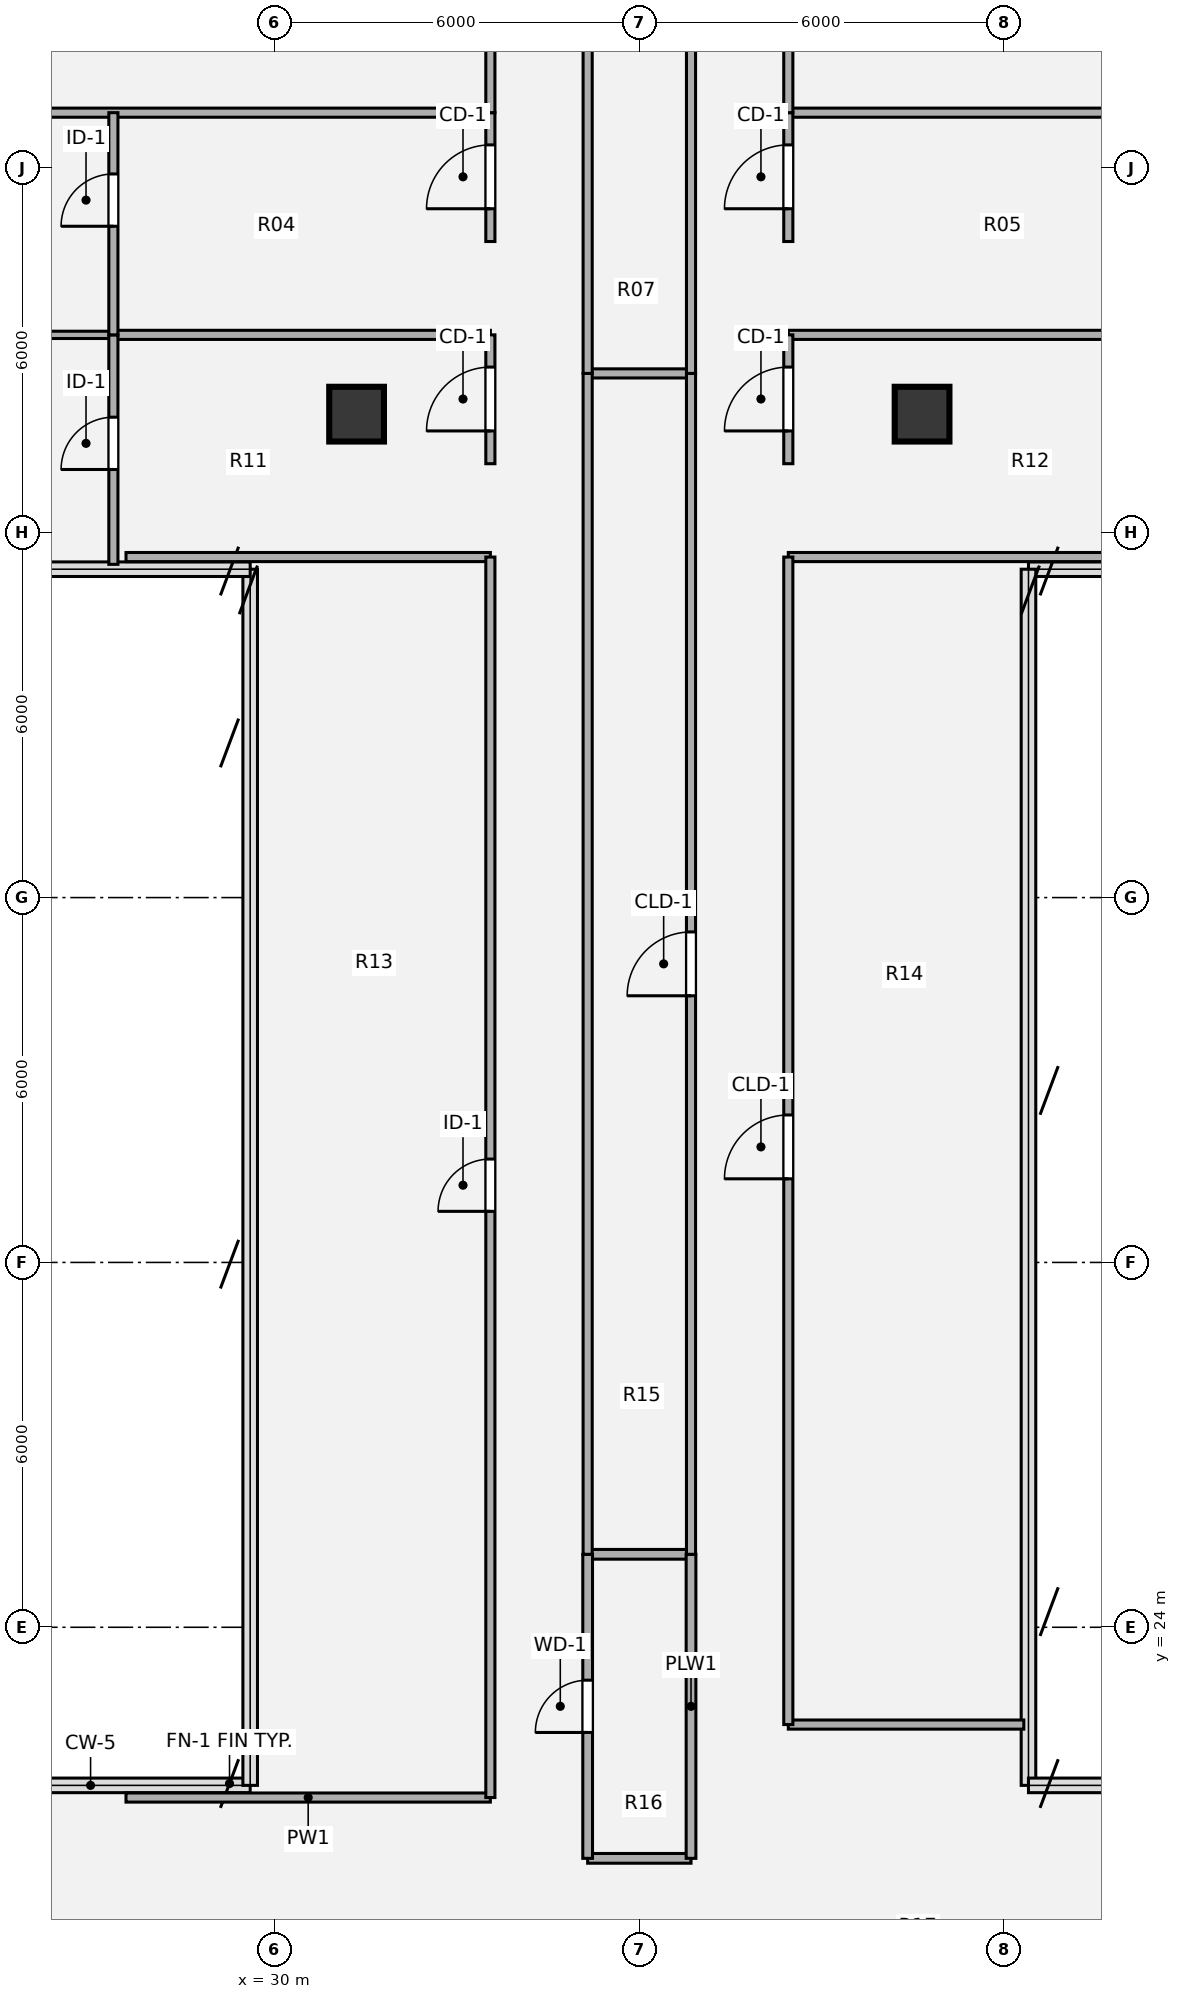
"""IFC4 building model, lengths in metres.
Left out: names, types, materials, properties, quantities, classifications, styles, units other than length and angle.
Written with IfcOpenShell. Run it as: python <this file> out.ifc"""

import sys

from ifc_helpers import new_model, si_unit, direction, frame, frame_2d, origin, origin_2d, place, context, subcontext, project, spatial, rectangle, hollow_circle, extrude, source, transform, mapped, element, fill, save


model = new_model("IFC4")
c1 = context("Model", 3, precision=1e-05, world=origin(), true_north=direction((0.0, 1.0)))
c2 = subcontext(c1, "Body", "Model", "MODEL_VIEW")
j1 = project(units=[si_unit("LENGTHUNIT", "METRE"), si_unit("PLANEANGLEUNIT", "RADIAN")], contexts=[c1])
p1 = place(None, origin())
s1 = spatial("IfcSite", under=j1, at=p1, CompositionType="ELEMENT")
p2 = place(p1, origin())
s2 = spatial("IfcBuilding", under=s1, at=p2, CompositionType="ELEMENT")
p3 = place(p2, frame((0.0, 0.0, 249.48)))
s3 = spatial("IfcBuildingStorey", under=s2, at=p3, CompositionType="ELEMENT", Elevation=249.48)
m1 = source(origin(), c2, "Body", "SweptSolid", [
    extrude(hollow_circle(Radius=0.45, WallThickness=0.032, at=origin_2d()), origin(), (0.0, 0.0, 1.0), 3.78),
])
for number, where, z_axis, x_axis in (
    (1, (31.35, 43.95, 0.0), (0.0, 0.0, 1.0), (1.0, 0.0, 0.0)),
    (2, (40.65, 43.95, 0.0), (0.0, 0.0, 1.0), (1.0, 0.0, 0.0)),
):
    element("IfcColumn", number, at=place(p3, frame(where, z_axis=z_axis, x_axis=x_axis)), inside=s3, PredefinedType="COLUMN", context=c2, shape_type="MappedRepresentation", body=[
        mapped(m1, transform((0.0, 0.0, 0.0), x_axis=(1.0, 0.0, 0.0), y_axis=(0.0, 1.0, 0.0), z_axis=(0.0, 0.0, 1.0), scale=1.0)),
    ])
p4 = place(p3, frame((35.15, 20.2, 0.0), z_axis=(0.0, 0.0, 1.0), x_axis=(1.0, 0.0, 0.0)))
e3 = element("IfcWall", 3, at=p4, inside=s3, PredefinedType="PLUMBINGWALL", context=c2, shape_type="SweptSolid", body=[
    extrude(rectangle(XDim=1.7, YDim=0.16, at=frame_2d((0.85, 0.0))), origin(), (0.0, 0.0, 1.0), 3.5),
])
p5 = place(p3, frame((27.558, 21.2, 0.0), z_axis=(0.0, 0.0, 1.0), x_axis=(1.0, 0.0, 0.0)))
e4 = element("IfcWall", 4, at=p5, inside=s3, PredefinedType="PARTITIONING", context=c2, shape_type="SweptSolid", body=[
    extrude(rectangle(XDim=5.992, YDim=0.15, at=frame_2d((2.996, 0.0))), origin(), (0.0, 0.0, 1.0), 3.5),
])
p6 = place(p3, frame((38.45, 22.4, 0.0), z_axis=(0.0, 0.0, 1.0), x_axis=(1.0, 0.0, 0.0)))
e5 = element("IfcWall", 5, at=p6, inside=s3, PredefinedType="PARTITIONING", context=c2, shape_type="SweptSolid", body=[
    extrude(rectangle(XDim=3.873, YDim=0.15, at=frame_2d((1.937, 0.0))), origin(), (0.0, 0.0, 1.0), 3.5),
])
p7 = place(p3, frame((35.15, 25.2, 0.0), z_axis=(0.0, 0.0, 1.0), x_axis=(1.0, 0.0, 0.0)))
e6 = element("IfcWall", 6, at=p7, inside=s3, PredefinedType="PLUMBINGWALL", context=c2, shape_type="SweptSolid", body=[
    extrude(rectangle(XDim=1.7, YDim=0.16, at=frame_2d((0.85, 0.0))), origin(), (0.0, 0.0, 1.0), 3.5),
])
p8 = place(p3, frame((27.558, 41.6, 0.0), z_axis=(0.0, 0.0, 1.0), x_axis=(1.0, 0.0, 0.0)))
e7 = element("IfcWall", 7, at=p8, inside=s3, PredefinedType="PARTITIONING", context=c2, shape_type="SweptSolid", body=[
    extrude(rectangle(XDim=5.992, YDim=0.15, at=frame_2d((2.996, 0.0))), origin(), (0.0, 0.0, 1.0), 3.5),
])
p9 = place(p3, frame((38.45, 41.6, 0.0), z_axis=(0.0, 0.0, 1.0), x_axis=(1.0, 0.0, 0.0)))
e8 = element("IfcWall", 8, at=p9, inside=s3, PredefinedType="PARTITIONING", context=c2, shape_type="SweptSolid", body=[
    extrude(rectangle(XDim=5.993, YDim=0.15, at=frame_2d((2.997, 0.0))), origin(), (0.0, 0.0, 1.0), 3.5),
])
p10 = place(p3, frame((35.15, 44.62, 0.0), z_axis=(0.0, 0.0, 1.0), x_axis=(1.0, 0.0, 0.0)))
e9 = element("IfcWall", 9, at=p10, inside=s3, PredefinedType="PARTITIONING", context=c2, shape_type="SweptSolid", body=[
    extrude(rectangle(XDim=1.7, YDim=0.15, at=frame_2d((0.85, 0.0))), origin(), (0.0, 0.0, 1.0), 3.259),
])
p11 = place(p3, frame((17.78, 45.254, 0.0), z_axis=(0.0, 0.0, 1.0), x_axis=(1.0, 0.0, 0.0)))
e10 = element("IfcWall", 10, at=p11, inside=s3, PredefinedType="PARTITIONING", context=c2, shape_type="SweptSolid", body=[
    extrude(rectangle(XDim=9.57, YDim=0.12, at=frame_2d((4.785, 0.0))), origin(), (0.0, 0.0, 1.0), 2.982),
])
for number, where, z_axis, x_axis in (
    (11, (27.35, 45.254, 0.0), (0.0, 0.0, 1.0), (1.0, 0.0, 0.0)),
    (12, (38.45, 45.254, 0.0), (0.0, 0.0, 1.0), (1.0, 0.0, 0.0)),
):
    element("IfcWall", number, at=place(p3, frame(where, z_axis=z_axis, x_axis=x_axis)), inside=s3, PredefinedType="PARTITIONING", context=c2, shape_type="SweptSolid", body=[
        extrude(rectangle(XDim=6.2, YDim=0.15, at=frame_2d((3.1, 0.0))), origin(), (0.0, 0.0, 1.0), 2.982),
    ])
for number, where, z_axis, x_axis in (
    (13, (17.78, 48.908, 0.0), (0.0, 0.0, 1.0), (1.0, 0.0, 0.0)),
    (14, (38.45, 48.908, 0.0), (0.0, 0.0, 1.0), (1.0, 0.0, 0.0)),
):
    element("IfcWall", number, at=place(p3, frame(where, z_axis=z_axis, x_axis=x_axis)), inside=s3, PredefinedType="PARTITIONING", context=c2, shape_type="SweptSolid", body=[
        extrude(rectangle(XDim=15.77, YDim=0.15, at=frame_2d((7.885, 0.0))), origin(), (0.0, 0.0, 1.0), 2.982),
    ])
p12 = place(p3, frame((27.35, 41.48, 0.0), z_axis=(0.0, 0.0, 1.0), x_axis=(0.0, 1.0, 0.0)))
e15 = element("IfcWall", 15, at=p12, inside=s3, PredefinedType="PARTITIONING", context=c2, shape_type="SweptSolid", body=[
    extrude(rectangle(XDim=3.774, YDim=0.15, at=frame_2d((1.887, 0.0))), origin(), (0.0, 0.0, 1.0), 3.5),
])
p13 = place(p12, frame((1.56, 0.0, 0.0)))
e16 = element("IfcOpeningElement", 16, at=p13, cuts=e15, PredefinedType="OPENING", context=c2, shape_type="SweptSolid", body=[
    extrude(rectangle(XDim=0.86, YDim=2.1, at=origin_2d()), frame((0.43, 0.085, 1.05), z_axis=(0.0, -1.0, 0.0), x_axis=(1.0, 0.0, 0.0)), (0.0, 0.0, 1.0), 0.17),
])
p14 = place(p3, frame((27.35, 45.254, 0.0), z_axis=(0.0, 0.0, 1.0), x_axis=(0.0, 1.0, 0.0)))
e17 = element("IfcWall", 17, at=p14, inside=s3, PredefinedType="PARTITIONING", context=c2, shape_type="SweptSolid", body=[
    extrude(rectangle(XDim=3.654, YDim=0.15, at=frame_2d((1.827, 0.0))), origin(), (0.0, 0.0, 1.0), 3.5),
])
p15 = place(p14, frame((1.786, 0.0, 0.0)))
e18 = element("IfcOpeningElement", 18, at=p15, cuts=e17, PredefinedType="OPENING", context=c2, shape_type="SweptSolid", body=[
    extrude(rectangle(XDim=0.86, YDim=2.1, at=origin_2d()), frame((0.43, 0.085, 1.05), z_axis=(0.0, -1.0, 0.0), x_axis=(1.0, 0.0, 0.0)), (0.0, 0.0, 1.0), 0.17),
])
p16 = place(p3, frame((33.55, 21.2, 0.0), z_axis=(0.0, 0.0, 1.0), x_axis=(0.0, 1.0, 0.0)))
e19 = element("IfcWall", 19, at=p16, inside=s3, PredefinedType="PARTITIONING", context=c2, shape_type="SweptSolid", body=[
    extrude(rectangle(XDim=20.4, YDim=0.15, at=frame_2d((10.2, 0.0))), origin(), (0.0, 0.0, 1.0), 3.5),
])
p17 = place(p16, frame((9.64, 0.0, 0.0)))
e20 = element("IfcOpeningElement", 20, at=p17, cuts=e19, PredefinedType="OPENING", context=c2, shape_type="SweptSolid", body=[
    extrude(rectangle(XDim=0.86, YDim=2.1, at=origin_2d()), frame((0.43, 0.085, 1.05), z_axis=(0.0, -1.0, 0.0), x_axis=(1.0, 0.0, 0.0)), (0.0, 0.0, 1.0), 0.17),
])
p18 = place(p3, frame((33.55, 43.135, 0.0), z_axis=(0.0, 0.0, 1.0), x_axis=(0.0, 1.0, 0.0)))
e21 = element("IfcWall", 21, at=p18, inside=s3, PredefinedType="PARTITIONING", context=c2, shape_type="SweptSolid", body=[
    extrude(rectangle(XDim=2.119, YDim=0.15, at=frame_2d((1.06, 0.0))), origin(), (0.0, 0.0, 1.0), 3.5),
])
p19 = place(p18, frame((0.539, 0.0, 0.0)))
e22 = element("IfcOpeningElement", 22, at=p19, cuts=e21, PredefinedType="OPENING", context=c2, shape_type="SweptSolid", body=[
    extrude(rectangle(XDim=1.05, YDim=2.1, at=origin_2d()), frame((0.525, 0.085, 1.05), z_axis=(0.0, -1.0, 0.0), x_axis=(1.0, 0.0, 0.0)), (0.0, 0.0, 1.0), 0.17),
])
p20 = place(p3, frame((33.55, 46.789, 0.0), z_axis=(0.0, 0.0, 1.0), x_axis=(0.0, 1.0, 0.0)))
e23 = element("IfcWall", 23, at=p20, inside=s3, PredefinedType="PARTITIONING", context=c2, shape_type="SweptSolid", body=[
    extrude(rectangle(XDim=2.119, YDim=0.15, at=frame_2d((1.06, 0.0))), origin(), (0.0, 0.0, 1.0), 3.5),
])
p21 = place(p20, frame((0.539, 0.0, 0.0)))
e24 = element("IfcOpeningElement", 24, at=p21, cuts=e23, PredefinedType="OPENING", context=c2, shape_type="SweptSolid", body=[
    extrude(rectangle(XDim=1.05, YDim=2.1, at=origin_2d()), frame((0.525, 0.085, 1.05), z_axis=(0.0, -1.0, 0.0), x_axis=(1.0, 0.0, 0.0)), (0.0, 0.0, 1.0), 0.17),
])
p22 = place(p3, frame((33.55, 48.908, 0.0), z_axis=(0.0, 0.0, 1.0), x_axis=(0.0, 1.0, 0.0)))
e25 = element("IfcWall", 25, at=p22, inside=s3, PredefinedType="PARTITIONING", context=c2, shape_type="SweptSolid", body=[
    extrude(rectangle(XDim=10.092, YDim=0.15, at=frame_2d((5.046, 0.0))), origin(), (0.0, 0.0, 1.0), 3.5),
])
p23 = place(p22, frame((4.521, 0.0, 0.0)))
e26 = element("IfcOpeningElement", 26, at=p23, cuts=e25, PredefinedType="OPENING", context=c2, shape_type="SweptSolid", body=[
    extrude(rectangle(XDim=1.05, YDim=2.1, at=origin_2d()), frame((0.525, 0.085, 1.05), z_axis=(0.0, -1.0, 0.0), x_axis=(1.0, 0.0, 0.0)), (0.0, 0.0, 1.0), 0.17),
])
p24 = place(p3, frame((35.15, 20.2, 0.0), z_axis=(0.0, 0.0, 1.0), x_axis=(0.0, 1.0, 0.0)))
e27 = element("IfcWall", 27, at=p24, inside=s3, PredefinedType="PLUMBINGWALL", context=c2, shape_type="SweptSolid", body=[
    extrude(rectangle(XDim=5.0, YDim=0.16, at=frame_2d((2.5, 0.0))), origin(), (0.0, 0.0, 1.0), 3.5),
])
p25 = place(p24, frame((2.07, 0.0, 0.0)))
e28 = element("IfcOpeningElement", 28, at=p25, cuts=e27, PredefinedType="OPENING", context=c2, shape_type="SweptSolid", body=[
    extrude(rectangle(XDim=0.86, YDim=2.1, at=origin_2d()), frame((0.43, 0.09, 1.05), z_axis=(0.0, -1.0, 0.0), x_axis=(1.0, 0.0, 0.0)), (0.0, 0.0, 1.0), 0.18),
])
p26 = place(p3, frame((35.15, 25.2, 0.0), z_axis=(0.0, 0.0, 1.0), x_axis=(0.0, 1.0, 0.0)))
e29 = element("IfcWall", 29, at=p26, inside=s3, PredefinedType="PARTITIONING", context=c2, shape_type="SweptSolid", body=[
    extrude(rectangle(XDim=19.42, YDim=0.15, at=frame_2d((9.71, 0.0))), origin(), (0.0, 0.0, 1.0), 3.5),
])
p27 = place(p3, frame((35.15, 44.62, 0.0), z_axis=(0.0, 0.0, 1.0), x_axis=(0.0, 1.0, 0.0)))
e30 = element("IfcWall", 30, at=p27, inside=s3, PredefinedType="PARTITIONING", context=c2, shape_type="SweptSolid", body=[
    extrude(rectangle(XDim=12.58, YDim=0.15, at=frame_2d((6.29, 0.0))), origin(), (0.0, 0.0, 1.0), 3.5),
])
p28 = place(p27, frame((5.83, 0.0, 0.0)))
e31 = element("IfcOpeningElement", 31, at=p28, cuts=e30, PredefinedType="OPENING", context=c2, shape_type="SweptSolid", body=[
    extrude(rectangle(XDim=0.86, YDim=2.1, at=origin_2d()), frame((0.43, 0.085, 1.05), z_axis=(0.0, -1.0, 0.0), x_axis=(1.0, 0.0, 0.0)), (0.0, 0.0, 1.0), 0.17),
])
p29 = place(p3, frame((36.85, 20.2, 0.0), z_axis=(0.0, 0.0, 1.0), x_axis=(0.0, 1.0, 0.0)))
e32 = element("IfcWall", 32, at=p29, inside=s3, PredefinedType="PLUMBINGWALL", context=c2, shape_type="SweptSolid", body=[
    extrude(rectangle(XDim=5.0, YDim=0.16, at=frame_2d((2.5, 0.0))), origin(), (0.0, 0.0, 1.0), 3.5),
])
p30 = place(p3, frame((36.85, 25.2, 0.0), z_axis=(0.0, 0.0, 1.0), x_axis=(0.0, 1.0, 0.0)))
e33 = element("IfcWall", 33, at=p30, inside=s3, PredefinedType="PARTITIONING", context=c2, shape_type="SweptSolid", body=[
    extrude(rectangle(XDim=19.42, YDim=0.15, at=frame_2d((9.71, 0.0))), origin(), (0.0, 0.0, 1.0), 3.5),
])
p31 = place(p30, frame((9.185, 0.0, 0.0)))
e34 = element("IfcOpeningElement", 34, at=p31, cuts=e33, PredefinedType="OPENING", context=c2, shape_type="SweptSolid", body=[
    extrude(rectangle(XDim=1.05, YDim=2.1, at=origin_2d()), frame((0.525, 0.085, 1.05), z_axis=(0.0, -1.0, 0.0), x_axis=(1.0, 0.0, 0.0)), (0.0, 0.0, 1.0), 0.17),
])
p32 = place(p3, frame((36.85, 44.62, 0.0), z_axis=(0.0, 0.0, 1.0), x_axis=(0.0, 1.0, 0.0)))
e35 = element("IfcWall", 35, at=p32, inside=s3, PredefinedType="PARTITIONING", context=c2, shape_type="SweptSolid", body=[
    extrude(rectangle(XDim=12.58, YDim=0.15, at=frame_2d((6.29, 0.0))), origin(), (0.0, 0.0, 1.0), 3.5),
])
p33 = place(p3, frame((38.45, 22.4, 0.0), z_axis=(0.0, 0.0, 1.0), x_axis=(0.0, 1.0, 0.0)))
e36 = element("IfcWall", 36, at=p33, inside=s3, PredefinedType="PARTITIONING", context=c2, shape_type="SweptSolid", body=[
    extrude(rectangle(XDim=19.2, YDim=0.15, at=frame_2d((9.6, 0.0))), origin(), (0.0, 0.0, 1.0), 3.5),
])
p34 = place(p33, frame((8.975, 0.0, 0.0)))
e37 = element("IfcOpeningElement", 37, at=p34, cuts=e36, PredefinedType="OPENING", context=c2, shape_type="SweptSolid", body=[
    extrude(rectangle(XDim=1.05, YDim=2.1, at=origin_2d()), frame((0.525, 0.085, 1.05), z_axis=(0.0, -1.0, 0.0), x_axis=(1.0, 0.0, 0.0)), (0.0, 0.0, 1.0), 0.17),
])
p35 = place(p3, frame((38.45, 43.135, 0.0), z_axis=(0.0, 0.0, 1.0), x_axis=(0.0, 1.0, 0.0)))
e38 = element("IfcWall", 38, at=p35, inside=s3, PredefinedType="PARTITIONING", context=c2, shape_type="SweptSolid", body=[
    extrude(rectangle(XDim=2.119, YDim=0.15, at=frame_2d((1.06, 0.0))), origin(), (0.0, 0.0, 1.0), 3.5),
])
p36 = place(p35, frame((0.539, 0.0, 0.0)))
e39 = element("IfcOpeningElement", 39, at=p36, cuts=e38, PredefinedType="OPENING", context=c2, shape_type="SweptSolid", body=[
    extrude(rectangle(XDim=1.05, YDim=2.1, at=origin_2d()), frame((0.525, 0.085, 1.05), z_axis=(0.0, -1.0, 0.0), x_axis=(1.0, 0.0, 0.0)), (0.0, 0.0, 1.0), 0.17),
])
p37 = place(p3, frame((38.45, 46.789, 0.0), z_axis=(0.0, 0.0, 1.0), x_axis=(0.0, 1.0, 0.0)))
e40 = element("IfcWall", 40, at=p37, inside=s3, PredefinedType="PARTITIONING", context=c2, shape_type="SweptSolid", body=[
    extrude(rectangle(XDim=2.119, YDim=0.15, at=frame_2d((1.06, 0.0))), origin(), (0.0, 0.0, 1.0), 3.5),
])
p38 = place(p37, frame((0.539, 0.0, 0.0)))
e41 = element("IfcOpeningElement", 41, at=p38, cuts=e40, PredefinedType="OPENING", context=c2, shape_type="SweptSolid", body=[
    extrude(rectangle(XDim=1.05, YDim=2.1, at=origin_2d()), frame((0.525, 0.085, 1.05), z_axis=(0.0, -1.0, 0.0), x_axis=(1.0, 0.0, 0.0)), (0.0, 0.0, 1.0), 0.17),
])
p39 = place(p3, frame((38.45, 48.908, 0.0), z_axis=(0.0, 0.0, 1.0), x_axis=(0.0, 1.0, 0.0)))
e42 = element("IfcWall", 42, at=p39, inside=s3, PredefinedType="PARTITIONING", context=c2, shape_type="SweptSolid", body=[
    extrude(rectangle(XDim=10.092, YDim=0.15, at=frame_2d((5.046, 0.0))), origin(), (0.0, 0.0, 1.0), 3.5),
])
p40 = place(p39, frame((4.521, 0.0, 0.0)))
e43 = element("IfcOpeningElement", 43, at=p40, cuts=e42, PredefinedType="OPENING", context=c2, shape_type="SweptSolid", body=[
    extrude(rectangle(XDim=1.05, YDim=2.1, at=origin_2d()), frame((0.525, 0.085, 1.05), z_axis=(0.0, -1.0, 0.0), x_axis=(1.0, 0.0, 0.0)), (0.0, 0.0, 1.0), 0.17),
])
m2 = source(origin(), c2, "Body", "SweptSolid", [
    extrude(rectangle(XDim=0.86, YDim=2.1, at=origin_2d()), frame((0.43, 0.025, 1.05), z_axis=(0.0, -1.0, 0.0), x_axis=(1.0, 0.0, 0.0)), (0.0, 0.0, 1.0), 0.05),
])
p41 = place(p13, origin())
e44 = element("IfcDoor", 44, at=p41, inside=s3, OperationType="SINGLE_SWING_LEFT", PredefinedType="DOOR", context=c2, shape_type="MappedRepresentation", body=[
    mapped(m2, transform((0.0, 0.0, 0.0), x_axis=(1.0, 0.0, 0.0), y_axis=(0.0, 1.0, 0.0), z_axis=(0.0, 0.0, 1.0), scale=1.0)),
])
fill(e16, e44)
p42 = place(p15, origin())
e45 = element("IfcDoor", 45, at=p42, inside=s3, OperationType="SINGLE_SWING_LEFT", PredefinedType="DOOR", context=c2, shape_type="MappedRepresentation", body=[
    mapped(m2, transform((0.0, 0.0, 0.0), x_axis=(1.0, 0.0, 0.0), y_axis=(0.0, 1.0, 0.0), z_axis=(0.0, 0.0, 1.0), scale=1.0)),
])
fill(e18, e45)
p43 = place(p17, origin())
e46 = element("IfcDoor", 46, at=p43, inside=s3, OperationType="SINGLE_SWING_LEFT", PredefinedType="DOOR", context=c2, shape_type="MappedRepresentation", body=[
    mapped(m2, transform((0.0, 0.0, 0.0), x_axis=(1.0, 0.0, 0.0), y_axis=(0.0, 1.0, 0.0), z_axis=(0.0, 0.0, 1.0), scale=1.0)),
])
fill(e20, e46)
m3 = source(origin(), c2, "Body", "SweptSolid", [
    extrude(rectangle(XDim=1.05, YDim=2.1, at=origin_2d()), frame((0.525, 0.025, 1.05), z_axis=(0.0, -1.0, 0.0), x_axis=(1.0, 0.0, 0.0)), (0.0, 0.0, 1.0), 0.05),
])
p44 = place(p19, origin())
e47 = element("IfcDoor", 47, at=p44, inside=s3, OperationType="SINGLE_SWING_LEFT", PredefinedType="DOOR", context=c2, shape_type="MappedRepresentation", body=[
    mapped(m3, transform((0.0, 0.0, 0.0), x_axis=(1.0, 0.0, 0.0), y_axis=(0.0, 1.0, 0.0), z_axis=(0.0, 0.0, 1.0), scale=1.0)),
])
fill(e22, e47)
p45 = place(p21, origin())
e48 = element("IfcDoor", 48, at=p45, inside=s3, OperationType="SINGLE_SWING_LEFT", PredefinedType="DOOR", context=c2, shape_type="MappedRepresentation", body=[
    mapped(m3, transform((0.0, 0.0, 0.0), x_axis=(1.0, 0.0, 0.0), y_axis=(0.0, 1.0, 0.0), z_axis=(0.0, 0.0, 1.0), scale=1.0)),
])
fill(e24, e48)
m4 = source(origin(), c2, "Body", "SweptSolid", [
    extrude(rectangle(XDim=0.86, YDim=2.1, at=origin_2d()), frame((0.43, 0.025, 1.05), z_axis=(0.0, -1.0, 0.0), x_axis=(1.0, 0.0, 0.0)), (0.0, 0.0, 1.0), 0.05),
])
p46 = place(p25, origin())
e49 = element("IfcDoor", 49, at=p46, inside=s3, OperationType="SINGLE_SWING_LEFT", PredefinedType="DOOR", context=c2, shape_type="MappedRepresentation", body=[
    mapped(m4, transform((0.0, 0.0, 0.0), x_axis=(1.0, 0.0, 0.0), y_axis=(0.0, 1.0, 0.0), z_axis=(0.0, 0.0, 1.0), scale=1.0)),
])
fill(e28, e49)
m5 = source(origin(), c2, "Body", "SweptSolid", [
    extrude(rectangle(XDim=1.05, YDim=2.1, at=origin_2d()), frame((0.525, 0.025, 1.05), z_axis=(0.0, -1.0, 0.0), x_axis=(1.0, 0.0, 0.0)), (0.0, 0.0, 1.0), 0.05),
])
p47 = place(p31, origin())
e50 = element("IfcDoor", 50, at=p47, inside=s3, OperationType="SINGLE_SWING_LEFT", PredefinedType="DOOR", context=c2, shape_type="MappedRepresentation", body=[
    mapped(m5, transform((0.0, 0.0, 0.0), x_axis=(1.0, 0.0, 0.0), y_axis=(0.0, 1.0, 0.0), z_axis=(0.0, 0.0, 1.0), scale=1.0)),
])
fill(e34, e50)
p48 = place(p34, origin())
e51 = element("IfcDoor", 51, at=p48, inside=s3, OperationType="SINGLE_SWING_LEFT", PredefinedType="DOOR", context=c2, shape_type="MappedRepresentation", body=[
    mapped(m5, transform((0.0, 0.0, 0.0), x_axis=(1.0, 0.0, 0.0), y_axis=(0.0, 1.0, 0.0), z_axis=(0.0, 0.0, 1.0), scale=1.0)),
])
fill(e37, e51)
p49 = place(p36, origin())
e52 = element("IfcDoor", 52, at=p49, inside=s3, OperationType="SINGLE_SWING_LEFT", PredefinedType="DOOR", context=c2, shape_type="MappedRepresentation", body=[
    mapped(m3, transform((0.0, 0.0, 0.0), x_axis=(1.0, 0.0, 0.0), y_axis=(0.0, 1.0, 0.0), z_axis=(0.0, 0.0, 1.0), scale=1.0)),
])
fill(e39, e52)
p50 = place(p38, origin())
e53 = element("IfcDoor", 53, at=p50, inside=s3, OperationType="SINGLE_SWING_LEFT", PredefinedType="DOOR", context=c2, shape_type="MappedRepresentation", body=[
    mapped(m3, transform((0.0, 0.0, 0.0), x_axis=(1.0, 0.0, 0.0), y_axis=(0.0, 1.0, 0.0), z_axis=(0.0, 0.0, 1.0), scale=1.0)),
])
fill(e41, e53)
save(model, sys.argv[1])
